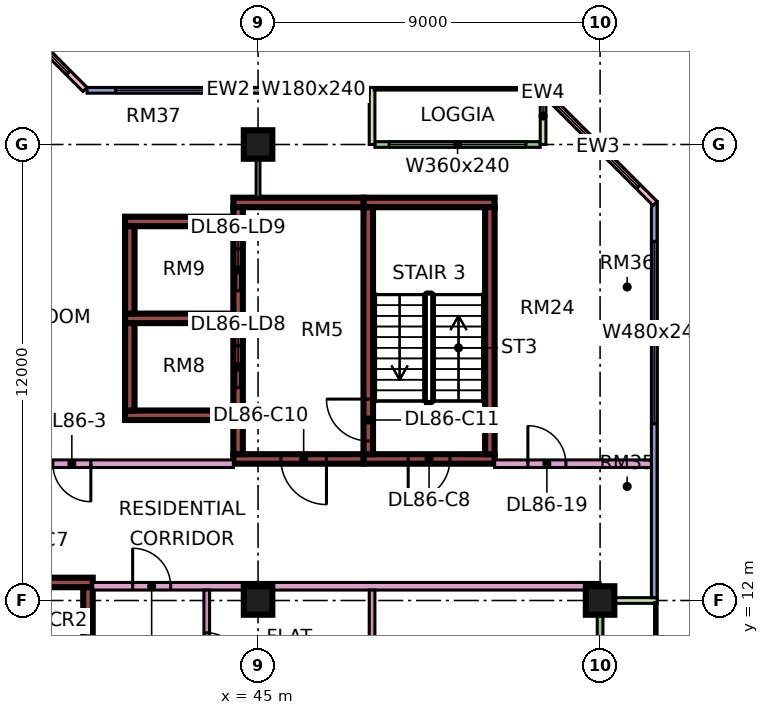
"""IFC4 building model, lengths in metres.
Left out: names, types, materials, properties, quantities, classifications, styles, units other than length and angle.
Written with IfcOpenShell. Run it as: python <this file> out.ifc"""

import sys

from ifc_helpers import new_model, si_unit, direction, frame, frame_2d, origin, origin_2d, place, context, subcontext, project, spatial, rectangle, extrude, element, fill, save


model = new_model("IFC4")
c1 = context("Model", 3, precision=1e-05, world=origin(), true_north=direction((0.0, 1.0)))
c2 = subcontext(c1, "Body", "Model", "MODEL_VIEW")
j1 = project(units=[si_unit("LENGTHUNIT", "METRE"), si_unit("PLANEANGLEUNIT", "RADIAN")], contexts=[c1])
p1 = place(None, origin())
s1 = spatial("IfcSite", under=j1, at=p1, CompositionType="ELEMENT")
p2 = place(p1, origin())
s2 = spatial("IfcBuilding", under=s1, at=p2, CompositionType="ELEMENT")
p3 = place(p2, frame((0.0, 0.0, 368.9)))
s3 = spatial("IfcBuildingStorey", under=s2, at=p3, CompositionType="ELEMENT", Elevation=368.9)
for number, where, z_axis, x_axis in (
    (1, (45.0, 12.0, 0.0), (0.0, 0.0, 1.0), (1.0, 0.0, 0.0)),
    (2, (45.0, 24.0, 0.0), (0.0, 0.0, 1.0), (1.0, 0.0, 0.0)),
    (3, (54.0, 12.0, 0.0), (0.0, 0.0, 1.0), (1.0, 0.0, 0.0)),
):
    element("IfcColumn", number, at=place(p3, frame(where, z_axis=z_axis, x_axis=x_axis)), inside=s3, PredefinedType="COLUMN", context=c2, shape_type="SweptSolid", body=[
        extrude(rectangle(XDim=0.75, YDim=0.75, at=origin_2d()), origin(), (0.0, 0.0, 1.0), 3.75),
    ])
p4 = place(p3, frame((36.375, 12.475, 0.0), z_axis=(0.0, 0.0, 1.0), x_axis=(1.0, 0.0, 0.0)))
e4 = element("IfcWall", 4, at=p4, inside=s3, PredefinedType="SHEAR", context=c2, shape_type="SweptSolid", body=[
    extrude(rectangle(XDim=4.275, YDim=0.25, at=frame_2d((2.137, 0.0))), origin(), (0.0, 0.0, 1.0), 3.75),
])
p5 = place(p4, frame((2.0, 0.0, 0.0)))
e5 = element("IfcOpeningElement", 5, at=p5, cuts=e4, PredefinedType="OPENING", context=c2, shape_type="SweptSolid", body=[
    extrude(rectangle(XDim=1.1, YDim=2.2, at=frame_2d((0.55, 1.1))), frame((0.0, 0.135, 0.0), z_axis=(0.0, -1.0, 0.0), x_axis=(1.0, 0.0, 0.0)), (0.0, 0.0, 1.0), 0.27),
])
p6 = place(p3, frame((40.525, 5.85, 0.0), z_axis=(0.0, 0.0, 1.0), x_axis=(0.0, 1.0, 0.0)))
e6 = element("IfcWall", 6, at=p6, inside=s3, PredefinedType="SHEAR", context=c2, shape_type="SweptSolid", body=[
    extrude(rectangle(XDim=6.5, YDim=0.25, at=frame_2d((3.25, 0.0))), origin(), (0.0, 0.0, 1.0), 3.75),
])
p7 = place(p3, frame((47.775, 15.725, 0.0), z_axis=(0.0, 0.0, 1.0), x_axis=(1.0, 0.0, 0.0)))
e7 = element("IfcWall", 7, at=p7, inside=s3, PredefinedType="SHEAR", context=c2, shape_type="SweptSolid", body=[
    extrude(rectangle(XDim=3.45, YDim=0.25, at=frame_2d((1.725, 0.0))), origin(), (0.0, 0.0, 1.0), 3.75),
])
p8 = place(p7, frame((1.175, 0.0, 0.0)))
e8 = element("IfcOpeningElement", 8, at=p8, cuts=e7, PredefinedType="OPENING", context=c2, shape_type="SweptSolid", body=[
    extrude(rectangle(XDim=1.1, YDim=2.2, at=frame_2d((0.55, 1.1))), frame((0.0, 0.135, 0.0), z_axis=(0.0, -1.0, 0.0), x_axis=(1.0, 0.0, 0.0)), (0.0, 0.0, 1.0), 0.27),
])
p9 = place(p3, frame((47.775, 22.475, 0.0), z_axis=(0.0, 0.0, 1.0), x_axis=(1.0, 0.0, 0.0)))
e9 = element("IfcWall", 9, at=p9, inside=s3, PredefinedType="SHEAR", context=c2, shape_type="SweptSolid", body=[
    extrude(rectangle(XDim=3.45, YDim=0.25, at=frame_2d((1.725, 0.0))), origin(), (0.0, 0.0, 1.0), 3.75),
])
p10 = place(p3, frame((47.9, 15.85, 0.0), z_axis=(0.0, 0.0, 1.0), x_axis=(0.0, 1.0, 0.0)))
e10 = element("IfcWall", 10, at=p10, inside=s3, PredefinedType="SHEAR", context=c2, shape_type="SweptSolid", body=[
    extrude(rectangle(XDim=6.5, YDim=0.25, at=frame_2d((3.25, 0.0))), origin(), (0.0, 0.0, 1.0), 3.75),
])
p11 = place(p10, frame((0.35, 0.0, 0.0)))
e11 = element("IfcOpeningElement", 11, at=p11, cuts=e10, PredefinedType="OPENING", context=c2, shape_type="SweptSolid", body=[
    extrude(rectangle(XDim=1.1, YDim=2.2, at=frame_2d((0.55, 1.1))), frame((0.0, 0.135, 0.0), z_axis=(0.0, -1.0, 0.0), x_axis=(1.0, 0.0, 0.0)), (0.0, 0.0, 1.0), 0.27),
])
p12 = place(p3, frame((51.1, 15.85, 0.0), z_axis=(0.0, 0.0, 1.0), x_axis=(0.0, 1.0, 0.0)))
e12 = element("IfcWall", 12, at=p12, inside=s3, PredefinedType="SHEAR", context=c2, shape_type="SweptSolid", body=[
    extrude(rectangle(XDim=6.5, YDim=0.25, at=frame_2d((3.25, 0.0))), origin(), (0.0, 0.0, 1.0), 3.75),
])
p13 = place(p3, frame((44.35, 15.725, 0.0), z_axis=(0.0, 0.0, 1.0), x_axis=(1.0, 0.0, 0.0)))
e13 = element("IfcWall", 13, at=p13, inside=s3, PredefinedType="SHEAR", context=c2, shape_type="SweptSolid", body=[
    extrude(rectangle(XDim=3.425, YDim=0.25, at=frame_2d((1.712, 0.0))), origin(), (0.0, 0.0, 1.0), 3.75),
])
p14 = place(p13, frame((1.25, 0.0, 0.0)))
e14 = element("IfcOpeningElement", 14, at=p14, cuts=e13, PredefinedType="OPENING", context=c2, shape_type="SweptSolid", body=[
    extrude(rectangle(XDim=1.2, YDim=2.2, at=frame_2d((0.6, 1.1))), frame((0.0, 0.135, 0.0), z_axis=(0.0, -1.0, 0.0), x_axis=(1.0, 0.0, 0.0)), (0.0, 0.0, 1.0), 0.27),
])
p15 = place(p3, frame((44.35, 22.475, 0.0), z_axis=(0.0, 0.0, 1.0), x_axis=(1.0, 0.0, 0.0)))
e15 = element("IfcWall", 15, at=p15, inside=s3, PredefinedType="SHEAR", context=c2, shape_type="SweptSolid", body=[
    extrude(rectangle(XDim=3.425, YDim=0.25, at=frame_2d((1.712, 0.0))), origin(), (0.0, 0.0, 1.0), 3.75),
])
p16 = place(p3, frame((44.475, 15.85, 0.0), z_axis=(0.0, 0.0, 1.0), x_axis=(0.0, 1.0, 0.0)))
e16 = element("IfcWall", 16, at=p16, inside=s3, PredefinedType="SHEAR", context=c2, shape_type="SweptSolid", body=[
    extrude(rectangle(XDim=6.5, YDim=0.25, at=frame_2d((3.25, 0.0))), origin(), (0.0, 0.0, 1.0), 3.75),
])
p17 = place(p16, frame((1.75, 0.0, 0.0)))
e17 = element("IfcOpeningElement", 17, at=p17, cuts=e16, PredefinedType="OPENING", context=c2, shape_type="SweptSolid", body=[
    extrude(rectangle(XDim=1.1, YDim=2.2, at=frame_2d((0.55, 1.1))), frame((0.0, 0.135, 0.0), z_axis=(0.0, -1.0, 0.0), x_axis=(1.0, 0.0, 0.0)), (0.0, 0.0, 1.0), 0.27),
])
p18 = place(p16, frame((4.3, 0.0, 0.0)))
e18 = element("IfcOpeningElement", 18, at=p18, cuts=e16, PredefinedType="OPENING", context=c2, shape_type="SweptSolid", body=[
    extrude(rectangle(XDim=1.1, YDim=2.2, at=frame_2d((0.55, 1.1))), frame((0.0, 0.135, 0.0), z_axis=(0.0, -1.0, 0.0), x_axis=(1.0, 0.0, 0.0)), (0.0, 0.0, 1.0), 0.27),
])
for number, where, z_axis, x_axis in (
    (19, (41.5, 16.875, 0.0), (0.0, 0.0, 1.0), (1.0, 0.0, 0.0)),
    (20, (41.5, 19.425, 0.0), (0.0, 0.0, 1.0), (1.0, 0.0, 0.0)),
    (21, (41.5, 21.975, 0.0), (0.0, 0.0, 1.0), (1.0, 0.0, 0.0)),
):
    element("IfcWall", number, at=place(p3, frame(where, z_axis=z_axis, x_axis=x_axis)), inside=s3, PredefinedType="SHEAR", context=c2, shape_type="SweptSolid", body=[
        extrude(rectangle(XDim=2.85, YDim=0.25, at=frame_2d((1.425, 0.0))), origin(), (0.0, 0.0, 1.0), 3.75),
    ])
for number, where, z_axis, x_axis in (
    (22, (41.625, 17.0, 0.0), (0.0, 0.0, 1.0), (0.0, 1.0, 0.0)),
    (23, (41.625, 19.55, 0.0), (0.0, 0.0, 1.0), (0.0, 1.0, 0.0)),
):
    element("IfcWall", number, at=place(p3, frame(where, z_axis=z_axis, x_axis=x_axis)), inside=s3, PredefinedType="SHEAR", context=c2, shape_type="SweptSolid", body=[
        extrude(rectangle(XDim=2.3, YDim=0.25, at=frame_2d((1.15, 0.0))), origin(), (0.0, 0.0, 1.0), 3.75),
    ])
p19 = place(p3, frame((52.425, 24.0, 0.0), z_axis=(0.0, 0.0, 1.0), x_axis=(-1.0, 0.0, 0.0)))
e24 = element("IfcWall", 24, at=p19, inside=s3, PredefinedType="SOLIDWALL", context=c2, shape_type="SweptSolid", body=[
    extrude(rectangle(XDim=4.35, YDim=0.15, at=frame_2d((2.175, 0.0))), origin(), (0.0, 0.0, 1.0), 3.35),
])
p20 = place(p19, frame((0.375, 0.0, 0.45)))
e25 = element("IfcOpeningElement", 25, at=p20, cuts=e24, PredefinedType="OPENING", context=c2, shape_type="SweptSolid", body=[
    extrude(rectangle(XDim=3.6, YDim=2.4, at=frame_2d((1.8, 1.2))), frame((0.0, 0.085, 0.0), z_axis=(0.0, -1.0, 0.0), x_axis=(1.0, 0.0, 0.0)), (0.0, 0.0, 1.0), 0.17),
])
for number, where, z_axis, x_axis in (
    (26, (52.5, 25.5, 0.0), (0.0, 0.0, 1.0), (0.0, -1.0, 0.0)),
    (27, (48.0, 25.5, 0.0), (0.0, 0.0, 1.0), (0.0, -1.0, 0.0)),
):
    element("IfcWall", number, at=place(p3, frame(where, z_axis=z_axis, x_axis=x_axis)), inside=s3, PredefinedType="SOLIDWALL", context=c2, shape_type="SweptSolid", body=[
        extrude(rectangle(XDim=1.5, YDim=0.15, at=frame_2d((0.75, 0.0))), origin(), (0.0, 0.0, 1.0), 3.35),
    ])
p21 = place(p3, frame((47.925, 25.425, 0.0), z_axis=(0.0, 0.0, 1.0), x_axis=(-1.0, 0.0, 0.0)))
e28 = element("IfcWall", 28, at=p21, inside=s3, PredefinedType="SOLIDWALL", context=c2, shape_type="SweptSolid", body=[
    extrude(rectangle(XDim=7.425, YDim=0.15, at=frame_2d((3.712, 0.0))), origin(), (0.0, 0.0, 1.0), 3.35),
])
p22 = place(p21, frame((0.562, 0.0, 0.45)))
e29 = element("IfcOpeningElement", 29, at=p22, cuts=e28, PredefinedType="OPENING", context=c2, shape_type="SweptSolid", body=[
    extrude(rectangle(XDim=1.8, YDim=2.4, at=frame_2d((0.9, 1.2))), frame((0.0, 0.085, 0.0), z_axis=(0.0, -1.0, 0.0), x_axis=(1.0, 0.0, 0.0)), (0.0, 0.0, 1.0), 0.17),
])
p23 = place(p21, frame((3.675, 0.0, 0.45)))
e30 = element("IfcOpeningElement", 30, at=p23, cuts=e28, PredefinedType="OPENING", context=c2, shape_type="SweptSolid", body=[
    extrude(rectangle(XDim=3.0, YDim=2.4, at=frame_2d((1.5, 1.2))), frame((0.0, 0.085, 0.0), z_axis=(0.0, -1.0, 0.0), x_axis=(1.0, 0.0, 0.0)), (0.0, 0.0, 1.0), 0.17),
])
p24 = place(p3, frame((40.447, 25.447, 0.0), z_axis=(0.0, 0.0, 1.0), x_axis=(-0.707106781187, 0.707106781187, 0.0)))
e31 = element("IfcWall", 31, at=p24, inside=s3, PredefinedType="SOLIDWALL", context=c2, shape_type="SweptSolid", body=[
    extrude(rectangle(XDim=4.243, YDim=0.15, at=frame_2d((2.121, 0.0))), origin(), (0.0, 0.0, 1.0), 3.35),
])
p25 = place(p24, frame((0.621, 0.0, 0.45)))
e32 = element("IfcOpeningElement", 32, at=p25, cuts=e31, PredefinedType="OPENING", context=c2, shape_type="SweptSolid", body=[
    extrude(rectangle(XDim=3.0, YDim=2.4, at=frame_2d((1.5, 1.2))), frame((0.0, 0.085, 0.0), z_axis=(0.0, -1.0, 0.0), x_axis=(1.0, 0.0, 0.0)), (0.0, 0.0, 1.0), 0.17),
])
p26 = place(p3, frame((54.0, 1.575, 0.0), z_axis=(0.0, 0.0, 1.0), x_axis=(0.0, 1.0, 0.0)))
e33 = element("IfcWall", 33, at=p26, inside=s3, PredefinedType="SOLIDWALL", context=c2, shape_type="SweptSolid", body=[
    extrude(rectangle(XDim=10.35, YDim=0.15, at=frame_2d((5.175, 0.0))), origin(), (0.0, 0.0, 1.0), 3.35),
])
p27 = place(p26, frame((0.663, 0.0, 0.0)))
e34 = element("IfcOpeningElement", 34, at=p27, cuts=e33, PredefinedType="OPENING", context=c2, shape_type="SweptSolid", body=[
    extrude(rectangle(XDim=1.8, YDim=2.4, at=frame_2d((0.9, 1.2))), frame((0.0, 0.085, 0.0), z_axis=(0.0, -1.0, 0.0), x_axis=(1.0, 0.0, 0.0)), (0.0, 0.0, 1.0), 0.17),
])
p28 = place(p26, frame((5.637, 0.0, 0.45)))
e35 = element("IfcOpeningElement", 35, at=p28, cuts=e33, PredefinedType="OPENING", context=c2, shape_type="SweptSolid", body=[
    extrude(rectangle(XDim=3.0, YDim=2.4, at=frame_2d((1.5, 1.2))), frame((0.0, 0.085, 0.0), z_axis=(0.0, -1.0, 0.0), x_axis=(1.0, 0.0, 0.0)), (0.0, 0.0, 1.0), 0.17),
])
p29 = place(p3, frame((55.5, 12.0, 0.0), z_axis=(0.0, 0.0, 1.0), x_axis=(-1.0, 0.0, 0.0)))
e36 = element("IfcWall", 36, at=p29, inside=s3, PredefinedType="SOLIDWALL", context=c2, shape_type="SweptSolid", body=[
    extrude(rectangle(XDim=1.5, YDim=0.15, at=frame_2d((0.75, 0.0))), origin(), (0.0, 0.0, 1.0), 3.35),
])
p30 = place(p3, frame((55.425, 12.075, 0.0), z_axis=(0.0, 0.0, 1.0), x_axis=(0.0, 1.0, 0.0)))
e37 = element("IfcWall", 37, at=p30, inside=s3, PredefinedType="SOLIDWALL", context=c2, shape_type="SweptSolid", body=[
    extrude(rectangle(XDim=10.425, YDim=0.15, at=frame_2d((5.212, 0.0))), origin(), (0.0, 0.0, 1.0), 3.35),
])
p31 = place(p30, frame((4.575, 0.0, 0.45)))
e38 = element("IfcOpeningElement", 38, at=p31, cuts=e37, PredefinedType="OPENING", context=c2, shape_type="SweptSolid", body=[
    extrude(rectangle(XDim=4.8, YDim=2.4, at=frame_2d((2.4, 1.2))), frame((0.0, 0.085, 0.0), z_axis=(0.0, -1.0, 0.0), x_axis=(1.0, 0.0, 0.0)), (0.0, 0.0, 1.0), 0.17),
])
p32 = place(p3, frame((55.447, 22.447, 0.0), z_axis=(0.0, 0.0, 1.0), x_axis=(-0.707106781187, 0.707106781187, 0.0)))
e39 = element("IfcWall", 39, at=p32, inside=s3, PredefinedType="SOLIDWALL", context=c2, shape_type="SweptSolid", body=[
    extrude(rectangle(XDim=4.243, YDim=0.15, at=frame_2d((2.121, 0.0))), origin(), (0.0, 0.0, 1.0), 3.35),
])
p33 = place(p32, frame((0.621, 0.0, 0.45)))
e40 = element("IfcOpeningElement", 40, at=p33, cuts=e39, PredefinedType="OPENING", context=c2, shape_type="SweptSolid", body=[
    extrude(rectangle(XDim=3.0, YDim=2.4, at=frame_2d((1.5, 1.2))), frame((0.0, 0.085, 0.0), z_axis=(0.0, -1.0, 0.0), x_axis=(1.0, 0.0, 0.0)), (0.0, 0.0, 1.0), 0.17),
])
p34 = place(p3, frame((34.0, 15.6, 0.0), z_axis=(0.0, 0.0, 1.0), x_axis=(1.0, 0.0, 0.0)))
e41 = element("IfcWall", 41, at=p34, inside=s3, PredefinedType="PARTITIONING", context=c2, shape_type="SweptSolid", body=[
    extrude(rectangle(XDim=10.35, YDim=0.2, at=frame_2d((5.175, 0.0))), origin(), (0.0, 0.0, 1.0), 3.35),
])
p35 = place(p34, frame((5.6, 0.0, 0.0)))
e42 = element("IfcOpeningElement", 42, at=p35, cuts=e41, PredefinedType="OPENING", context=c2, shape_type="SweptSolid", body=[
    extrude(rectangle(XDim=1.0, YDim=2.1, at=frame_2d((0.5, 1.05))), frame((0.0, 0.11, 0.0), z_axis=(0.0, -1.0, 0.0), x_axis=(1.0, 0.0, 0.0)), (0.0, 0.0, 1.0), 0.22),
])
p36 = place(p34, frame((0.45, 0.0, 0.0)))
e43 = element("IfcOpeningElement", 43, at=p36, cuts=e41, PredefinedType="OPENING", context=c2, shape_type="SweptSolid", body=[
    extrude(rectangle(XDim=1.2, YDim=2.1, at=frame_2d((0.6, 1.05))), frame((0.0, 0.11, 0.0), z_axis=(0.0, -1.0, 0.0), x_axis=(1.0, 0.0, 0.0)), (0.0, 0.0, 1.0), 0.22),
])
p37 = place(p3, frame((40.65, 12.375, 0.0), z_axis=(0.0, 0.0, 1.0), x_axis=(1.0, 0.0, 0.0)))
e44 = element("IfcWall", 44, at=p37, inside=s3, PredefinedType="PARTITIONING", context=c2, shape_type="SweptSolid", body=[
    extrude(rectangle(XDim=13.35, YDim=0.2, at=frame_2d((6.675, 0.0))), origin(), (0.0, 0.0, 1.0), 3.35),
])
p38 = place(p37, frame((1.05, 0.0, 0.0)))
e45 = element("IfcOpeningElement", 45, at=p38, cuts=e44, PredefinedType="OPENING", context=c2, shape_type="SweptSolid", body=[
    extrude(rectangle(XDim=1.0, YDim=2.1, at=frame_2d((0.5, 1.05))), frame((0.0, 0.11, 0.0), z_axis=(0.0, -1.0, 0.0), x_axis=(1.0, 0.0, 0.0)), (0.0, 0.0, 1.0), 0.22),
])
p39 = place(p3, frame((43.65, 5.975, 0.0), z_axis=(0.0, 0.0, 1.0), x_axis=(0.0, 1.0, 0.0)))
e46 = element("IfcWall", 46, at=p39, inside=s3, PredefinedType="PARTITIONING", context=c2, shape_type="SweptSolid", body=[
    extrude(rectangle(XDim=6.3, YDim=0.15, at=frame_2d((3.15, 0.0))), origin(), (0.0, 0.0, 1.0), 3.35),
])
p40 = place(p39, frame((4.275, 0.0, 0.0)))
e47 = element("IfcOpeningElement", 47, at=p40, cuts=e46, PredefinedType="OPENING", context=c2, shape_type="SweptSolid", body=[
    extrude(rectangle(XDim=0.9, YDim=2.1, at=frame_2d((0.45, 1.05))), frame((0.0, 0.085, 0.0), z_axis=(0.0, -1.0, 0.0), x_axis=(1.0, 0.0, 0.0)), (0.0, 0.0, 1.0), 0.17),
])
p41 = place(p3, frame((45.0, 22.6, 0.0), z_axis=(0.0, 0.0, 1.0), x_axis=(0.0, 1.0, 0.0)))
e48 = element("IfcWall", 48, at=p41, inside=s3, PredefinedType="PARTITIONING", context=c2, shape_type="SweptSolid", body=[
    extrude(rectangle(XDim=1.4, YDim=0.1, at=frame_2d((0.7, 0.0))), origin(), (0.0, 0.0, 1.0), 3.35),
])
p42 = place(p3, frame((48.0, 5.975, 0.0), z_axis=(0.0, 0.0, 1.0), x_axis=(0.0, 1.0, 0.0)))
e49 = element("IfcWall", 49, at=p42, inside=s3, PredefinedType="PARTITIONING", context=c2, shape_type="SweptSolid", body=[
    extrude(rectangle(XDim=6.3, YDim=0.15, at=frame_2d((3.15, 0.0))), origin(), (0.0, 0.0, 1.0), 3.35),
])
p43 = place(p3, frame((51.225, 15.6, 0.0), z_axis=(0.0, 0.0, 1.0), x_axis=(1.0, 0.0, 0.0)))
e50 = element("IfcWall", 50, at=p43, inside=s3, PredefinedType="PARTITIONING", context=c2, shape_type="SweptSolid", body=[
    extrude(rectangle(XDim=4.125, YDim=0.2, at=frame_2d((2.062, 0.0))), origin(), (0.0, 0.0, 1.0), 3.35),
])
p44 = place(p43, frame((0.875, 0.0, 0.0)))
e51 = element("IfcOpeningElement", 51, at=p44, cuts=e50, PredefinedType="OPENING", context=c2, shape_type="SweptSolid", body=[
    extrude(rectangle(XDim=1.0, YDim=2.1, at=frame_2d((0.5, 1.05))), frame((0.0, 0.11, 0.0), z_axis=(0.0, -1.0, 0.0), x_axis=(1.0, 0.0, 0.0)), (0.0, 0.0, 1.0), 0.22),
])
p45 = place(p20, origin())
e52 = element("IfcWindow", 52, at=p45, inside=s3, PartitioningType="SINGLE_PANEL", PredefinedType="WINDOW", context=c2, shape_type="SweptSolid", body=[
    extrude(rectangle(XDim=3.6, YDim=2.4, at=frame_2d((1.8, 1.2))), frame((0.0, 0.03, 0.0), z_axis=(0.0, -1.0, 0.0), x_axis=(1.0, 0.0, 0.0)), (0.0, 0.0, 1.0), 0.06),
])
fill(e25, e52)
p46 = place(p22, origin())
e53 = element("IfcWindow", 53, at=p46, inside=s3, PartitioningType="SINGLE_PANEL", PredefinedType="WINDOW", context=c2, shape_type="SweptSolid", body=[
    extrude(rectangle(XDim=1.8, YDim=2.4, at=frame_2d((0.9, 1.2))), frame((0.0, 0.03, 0.0), z_axis=(0.0, -1.0, 0.0), x_axis=(1.0, 0.0, 0.0)), (0.0, 0.0, 1.0), 0.06),
])
fill(e29, e53)
p47 = place(p23, origin())
e54 = element("IfcWindow", 54, at=p47, inside=s3, PartitioningType="SINGLE_PANEL", PredefinedType="WINDOW", context=c2, shape_type="SweptSolid", body=[
    extrude(rectangle(XDim=3.0, YDim=2.4, at=frame_2d((1.5, 1.2))), frame((0.0, 0.03, 0.0), z_axis=(0.0, -1.0, 0.0), x_axis=(1.0, 0.0, 0.0)), (0.0, 0.0, 1.0), 0.06),
])
fill(e30, e54)
p48 = place(p25, origin())
e55 = element("IfcWindow", 55, at=p48, inside=s3, PartitioningType="SINGLE_PANEL", PredefinedType="WINDOW", context=c2, shape_type="SweptSolid", body=[
    extrude(rectangle(XDim=3.0, YDim=2.4, at=frame_2d((1.5, 1.2))), frame((0.0, 0.03, 0.0), z_axis=(0.0, -1.0, 0.0), x_axis=(1.0, 0.0, 0.0)), (0.0, 0.0, 1.0), 0.06),
])
fill(e32, e55)
p49 = place(p31, origin())
e56 = element("IfcWindow", 56, at=p49, inside=s3, PartitioningType="SINGLE_PANEL", PredefinedType="WINDOW", context=c2, shape_type="SweptSolid", body=[
    extrude(rectangle(XDim=4.8, YDim=2.4, at=frame_2d((2.4, 1.2))), frame((0.0, 0.03, 0.0), z_axis=(0.0, -1.0, 0.0), x_axis=(1.0, 0.0, 0.0)), (0.0, 0.0, 1.0), 0.06),
])
fill(e38, e56)
p50 = place(p33, origin())
e57 = element("IfcWindow", 57, at=p50, inside=s3, PartitioningType="SINGLE_PANEL", PredefinedType="WINDOW", context=c2, shape_type="SweptSolid", body=[
    extrude(rectangle(XDim=3.0, YDim=2.4, at=frame_2d((1.5, 1.2))), frame((0.0, 0.03, 0.0), z_axis=(0.0, -1.0, 0.0), x_axis=(1.0, 0.0, 0.0)), (0.0, 0.0, 1.0), 0.06),
])
fill(e40, e57)
p51 = place(p8, frame((1.1, 0.0, 0.0), z_axis=(0.0, 0.0, 1.0), x_axis=(-1.0, 0.0, 0.0)))
e58 = element("IfcDoor", 58, at=p51, inside=s3, OperationType="SINGLE_SWING_LEFT", PredefinedType="DOOR", context=c2, shape_type="SweptSolid", body=[
    extrude(rectangle(XDim=1.1, YDim=2.2, at=frame_2d((0.55, 1.1))), frame((0.0, 0.025, 0.0), z_axis=(0.0, -1.0, 0.0), x_axis=(1.0, 0.0, 0.0)), (0.0, 0.0, 1.0), 0.05),
])
fill(e8, e58)
p52 = place(p14, origin())
e59 = element("IfcDoor", 59, at=p52, inside=s3, OperationType="SINGLE_SWING_RIGHT", PredefinedType="DOOR", context=c2, shape_type="SweptSolid", body=[
    extrude(rectangle(XDim=1.2, YDim=2.2, at=frame_2d((0.6, 1.1))), frame((0.0, 0.025, 0.0), z_axis=(0.0, -1.0, 0.0), x_axis=(1.0, 0.0, 0.0)), (0.0, 0.0, 1.0), 0.05),
])
fill(e14, e59)
p53 = place(p11, frame((1.1, 0.0, 0.0), z_axis=(0.0, 0.0, 1.0), x_axis=(-1.0, 0.0, 0.0)))
e60 = element("IfcDoor", 60, at=p53, inside=s3, OperationType="SINGLE_SWING_RIGHT", PredefinedType="DOOR", context=c2, shape_type="SweptSolid", body=[
    extrude(rectangle(XDim=1.1, YDim=2.2, at=frame_2d((0.55, 1.1))), frame((0.0, 0.025, 0.0), z_axis=(0.0, -1.0, 0.0), x_axis=(1.0, 0.0, 0.0)), (0.0, 0.0, 1.0), 0.05),
])
fill(e11, e60)
p54 = place(p17, origin())
e61 = element("IfcDoor", 61, at=p54, inside=s3, OperationType="DOUBLE_DOOR_SLIDING", PredefinedType="DOOR", context=c2, shape_type="SweptSolid", body=[
    extrude(rectangle(XDim=1.1, YDim=2.2, at=frame_2d((0.55, 1.1))), frame((0.0, 0.025, 0.0), z_axis=(0.0, -1.0, 0.0), x_axis=(1.0, 0.0, 0.0)), (0.0, 0.0, 1.0), 0.05),
])
fill(e17, e61)
p55 = place(p18, origin())
e62 = element("IfcDoor", 62, at=p55, inside=s3, OperationType="DOUBLE_DOOR_SLIDING", PredefinedType="DOOR", context=c2, shape_type="SweptSolid", body=[
    extrude(rectangle(XDim=1.1, YDim=2.2, at=frame_2d((0.55, 1.1))), frame((0.0, 0.025, 0.0), z_axis=(0.0, -1.0, 0.0), x_axis=(1.0, 0.0, 0.0)), (0.0, 0.0, 1.0), 0.05),
])
fill(e18, e62)
p56 = place(p35, origin())
e63 = element("IfcDoor", 63, at=p56, inside=s3, OperationType="SINGLE_SWING_RIGHT", PredefinedType="DOOR", context=c2, shape_type="SweptSolid", body=[
    extrude(rectangle(XDim=1.0, YDim=2.1, at=frame_2d((0.5, 1.05))), frame((0.0, 0.025, 0.0), z_axis=(0.0, -1.0, 0.0), x_axis=(1.0, 0.0, 0.0)), (0.0, 0.0, 1.0), 0.05),
])
fill(e42, e63)
p57 = place(p44, origin())
e64 = element("IfcDoor", 64, at=p57, inside=s3, OperationType="SINGLE_SWING_LEFT", PredefinedType="DOOR", context=c2, shape_type="SweptSolid", body=[
    extrude(rectangle(XDim=1.0, YDim=2.1, at=frame_2d((0.5, 1.05))), frame((0.0, 0.025, 0.0), z_axis=(0.0, -1.0, 0.0), x_axis=(1.0, 0.0, 0.0)), (0.0, 0.0, 1.0), 0.05),
])
fill(e51, e64)
p58 = place(p38, origin())
e65 = element("IfcDoor", 65, at=p58, inside=s3, OperationType="SINGLE_SWING_LEFT", PredefinedType="DOOR", context=c2, shape_type="SweptSolid", body=[
    extrude(rectangle(XDim=1.0, YDim=2.1, at=frame_2d((0.5, 1.05))), frame((0.0, 0.025, 0.0), z_axis=(0.0, -1.0, 0.0), x_axis=(1.0, 0.0, 0.0)), (0.0, 0.0, 1.0), 0.05),
])
fill(e45, e65)
p59 = place(p40, frame((0.9, 0.0, 0.0), z_axis=(0.0, 0.0, 1.0), x_axis=(-1.0, 0.0, 0.0)))
e66 = element("IfcDoor", 66, at=p59, inside=s3, OperationType="SINGLE_SWING_LEFT", PredefinedType="DOOR", context=c2, shape_type="SweptSolid", body=[
    extrude(rectangle(XDim=0.9, YDim=2.1, at=frame_2d((0.45, 1.05))), frame((0.0, 0.025, 0.0), z_axis=(0.0, -1.0, 0.0), x_axis=(1.0, 0.0, 0.0)), (0.0, 0.0, 1.0), 0.05),
])
fill(e47, e66)
save(model, sys.argv[1])
